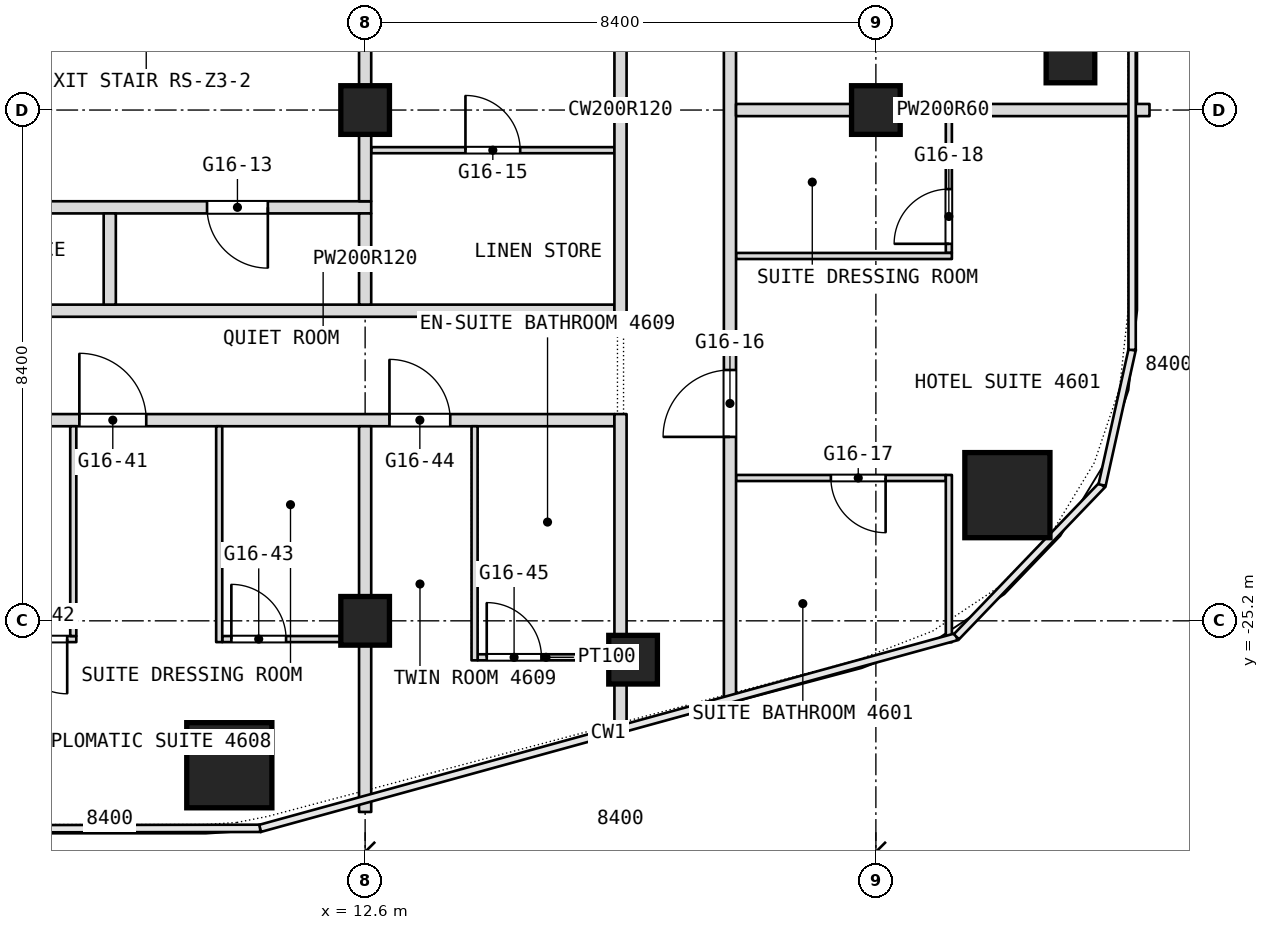
"""IFC4 building model, lengths in metres.
Left out: names, types, materials, properties, quantities, classifications, styles, units other than length and angle.
Written with IfcOpenShell. Run it as: python <this file> out.ifc"""

import sys

from ifc_helpers import new_model, si_unit, direction, frame, frame_2d, origin, origin_2d, place, context, subcontext, project, spatial, rectangle, extrude, element, fill, save


model = new_model("IFC4")
c1 = context("Model", 3, precision=1e-05, world=origin(), true_north=direction((0.0, 1.0)))
c2 = subcontext(c1, "Body", "Model", "MODEL_VIEW")
j1 = project(units=[si_unit("LENGTHUNIT", "METRE"), si_unit("PLANEANGLEUNIT", "RADIAN")], contexts=[c1])
p1 = place(None, origin())
s1 = spatial("IfcSite", under=j1, at=p1, CompositionType="ELEMENT")
p2 = place(p1, origin())
s2 = spatial("IfcBuilding", under=s1, at=p2, CompositionType="ELEMENT")
p3 = place(p2, frame((0.0, 0.0, 202.1)))
s3 = spatial("IfcBuildingStorey", under=s2, at=p3, CompositionType="ELEMENT", Elevation=202.1)
for number, where, z_axis, x_axis in (
    (1, (10.366, -27.575, 0.0), (0.0, 0.0, 1.0), (1.0, 0.0, 0.0)),
    (2, (23.163, -23.133, 0.0), (0.0, 0.0, 1.0), (1.0, 0.0, 0.0)),
):
    element("IfcColumn", number, at=place(p3, frame(where, z_axis=z_axis, x_axis=x_axis)), inside=s3, PredefinedType="COLUMN", context=c2, shape_type="SweptSolid", body=[
        extrude(rectangle(XDim=1.4, YDim=1.4, at=origin_2d()), origin(), (0.0, 0.0, 1.0), 3.6),
    ])
for number, where, z_axis, x_axis in (
    (3, (12.6, -25.2, 0.0), (0.0, 0.0, 1.0), (1.0, 0.0, 0.0)),
    (4, (12.6, -16.8, 0.0), (0.0, 0.0, 1.0), (1.0, 0.0, 0.0)),
    (5, (21.0, -16.8, 0.0), (0.0, 0.0, 1.0), (1.0, 0.0, 0.0)),
    (6, (24.2, -15.952, 0.0), (0.0, 0.0, 1.0), (1.0, 0.0, 0.0)),
    (7, (17.007, -25.839, 0.0), (0.0, 0.0, 1.0), (1.0, 0.0, 0.0)),
):
    element("IfcColumn", number, at=place(p3, frame(where, z_axis=z_axis, x_axis=x_axis)), inside=s3, PredefinedType="COLUMN", context=c2, shape_type="SweptSolid", body=[
        extrude(rectangle(XDim=0.8, YDim=0.8, at=origin_2d()), origin(), (0.0, 0.0, 1.0), 3.6),
    ])
p4 = place(p3, frame((14.45, -25.8, 0.0), z_axis=(0.0, 0.0, 1.0), x_axis=(1.0, 0.0, 0.0)))
e8 = element("IfcWall", 8, at=p4, inside=s3, PredefinedType="PARTITIONING", context=c2, shape_type="SweptSolid", body=[
    extrude(rectangle(XDim=2.25, YDim=0.1, at=frame_2d((1.125, 0.0))), origin(), (0.0, 0.0, 1.0), 3.34),
])
p5 = place(p4, frame((0.15, 0.0, 0.0)))
e9 = element("IfcOpeningElement", 9, at=p5, cuts=e8, PredefinedType="OPENING", context=c2, shape_type="SweptSolid", body=[
    extrude(rectangle(XDim=0.9, YDim=2.1, at=frame_2d((0.45, 1.05))), frame((0.0, 0.05, 0.0), z_axis=(0.0, -1.0, 0.0), x_axis=(1.0, 0.0, 0.0)), (0.0, 0.0, 1.0), 0.1),
])
p6 = place(p3, frame((0.65, -25.5, 0.0), z_axis=(0.0, 0.0, 1.0), x_axis=(1.0, 0.0, 0.0)))
e10 = element("IfcWall", 10, at=p6, inside=s3, PredefinedType="PARTITIONING", context=c2, shape_type="SweptSolid", body=[
    extrude(rectangle(XDim=7.2, YDim=0.1, at=frame_2d((3.6, 0.0))), origin(), (0.0, 0.0, 1.0), 3.34),
])
p7 = place(p6, frame((0.15, 0.0, 0.0)))
e11 = element("IfcOpeningElement", 11, at=p7, cuts=e10, PredefinedType="OPENING", context=c2, shape_type="SweptSolid", body=[
    extrude(rectangle(XDim=0.9, YDim=2.1, at=frame_2d((0.45, 1.05))), frame((0.0, 0.05, 0.0), z_axis=(0.0, -1.0, 0.0), x_axis=(1.0, 0.0, 0.0)), (0.0, 0.0, 1.0), 0.1),
])
p8 = place(p6, frame((6.15, 0.0, 0.0)))
e12 = element("IfcOpeningElement", 12, at=p8, cuts=e10, PredefinedType="OPENING", context=c2, shape_type="SweptSolid", body=[
    extrude(rectangle(XDim=0.9, YDim=2.1, at=frame_2d((0.45, 1.05))), frame((0.0, 0.05, 0.0), z_axis=(0.0, -1.0, 0.0), x_axis=(1.0, 0.0, 0.0)), (0.0, 0.0, 1.0), 0.1),
])
p9 = place(p3, frame((10.25, -25.5, 0.0), z_axis=(0.0, 0.0, 1.0), x_axis=(1.0, 0.0, 0.0)))
e13 = element("IfcWall", 13, at=p9, inside=s3, PredefinedType="PARTITIONING", context=c2, shape_type="SweptSolid", body=[
    extrude(rectangle(XDim=2.45, YDim=0.1, at=frame_2d((1.225, 0.0))), origin(), (0.0, 0.0, 1.0), 3.34),
])
p10 = place(p9, frame((0.15, 0.0, 0.0)))
e14 = element("IfcOpeningElement", 14, at=p10, cuts=e13, PredefinedType="OPENING", context=c2, shape_type="SweptSolid", body=[
    extrude(rectangle(XDim=0.9, YDim=2.1, at=frame_2d((0.45, 1.05))), frame((0.0, 0.05, 0.0), z_axis=(0.0, -1.0, 0.0), x_axis=(1.0, 0.0, 0.0)), (0.0, 0.0, 1.0), 0.1),
])
p11 = place(p3, frame((18.7, -22.851, 0.0), z_axis=(0.0, 0.0, 1.0), x_axis=(1.0, 0.0, 0.0)))
e15 = element("IfcWall", 15, at=p11, inside=s3, PredefinedType="PARTITIONING", context=c2, shape_type="SweptSolid", body=[
    extrude(rectangle(XDim=3.45, YDim=0.1, at=frame_2d((1.725, 0.0))), origin(), (0.0, 0.0, 1.0), 3.34),
])
p12 = place(p11, frame((1.56, 0.0, 0.0)))
e16 = element("IfcOpeningElement", 16, at=p12, cuts=e15, PredefinedType="OPENING", context=c2, shape_type="SweptSolid", body=[
    extrude(rectangle(XDim=0.9, YDim=2.1, at=frame_2d((0.45, 1.05))), frame((0.0, 0.05, 0.0), z_axis=(0.0, -1.0, 0.0), x_axis=(1.0, 0.0, 0.0)), (0.0, 0.0, 1.0), 0.1),
])
p13 = place(p3, frame((22.2, -25.552, 0.0), z_axis=(0.0, 0.0, 1.0), x_axis=(0.0, 1.0, 0.0)))
e17 = element("IfcWall", 17, at=p13, inside=s3, PredefinedType="PARTITIONING", context=c2, shape_type="SweptSolid", body=[
    extrude(rectangle(XDim=2.751, YDim=0.1, at=frame_2d((1.375, 0.0))), origin(), (0.0, 0.0, 1.0), 3.34),
])
p14 = place(p3, frame((22.2, -19.15, 0.0), z_axis=(0.0, 0.0, 1.0), x_axis=(0.0, 1.0, 0.0)))
e18 = element("IfcWall", 18, at=p14, inside=s3, PredefinedType="PARTITIONING", context=c2, shape_type="SweptSolid", body=[
    extrude(rectangle(XDim=2.45, YDim=0.1, at=frame_2d((1.225, 0.0))), origin(), (0.0, 0.0, 1.0), 3.34),
])
p15 = place(p14, frame((0.15, 0.0, 0.0)))
e19 = element("IfcOpeningElement", 19, at=p15, cuts=e18, PredefinedType="OPENING", context=c2, shape_type="SweptSolid", body=[
    extrude(rectangle(XDim=0.9, YDim=2.1, at=frame_2d((0.45, 1.05))), frame((0.0, 0.05, 0.0), z_axis=(0.0, -1.0, 0.0), x_axis=(1.0, 0.0, 0.0)), (0.0, 0.0, 1.0), 0.1),
])
p16 = place(p3, frame((-16.7, -21.9, 0.0), z_axis=(0.0, 0.0, 1.0), x_axis=(1.0, 0.0, 0.0)))
e20 = element("IfcWall", 20, at=p16, inside=s3, PredefinedType="PARTITIONING", context=c2, shape_type="SweptSolid", body=[
    extrude(rectangle(XDim=33.4, YDim=0.2, at=frame_2d((16.7, 0.0))), origin(), (0.0, 0.0, 1.0), 3.34),
])
p17 = place(p16, frame((0.3, 0.0, 0.0)))
e21 = element("IfcOpeningElement", 21, at=p17, cuts=e20, PredefinedType="OPENING", context=c2, shape_type="SweptSolid", body=[
    extrude(rectangle(XDim=1.0, YDim=2.1, at=frame_2d((0.5, 1.05))), frame((0.0, 0.1, 0.0), z_axis=(0.0, -1.0, 0.0), x_axis=(1.0, 0.0, 0.0)), (0.0, 0.0, 1.0), 0.2),
])
p18 = place(p16, frame((9.85, 0.0, 0.0)))
e22 = element("IfcOpeningElement", 22, at=p18, cuts=e20, PredefinedType="OPENING", context=c2, shape_type="SweptSolid", body=[
    extrude(rectangle(XDim=1.1, YDim=2.1, at=frame_2d((0.55, 1.05))), frame((0.0, 0.1, 0.0), z_axis=(0.0, -1.0, 0.0), x_axis=(1.0, 0.0, 0.0)), (0.0, 0.0, 1.0), 0.2),
])
p19 = place(p16, frame((16.1, 0.0, 0.0)))
e23 = element("IfcOpeningElement", 23, at=p19, cuts=e20, PredefinedType="OPENING", context=c2, shape_type="SweptSolid", body=[
    extrude(rectangle(XDim=1.1, YDim=2.1, at=frame_2d((0.55, 1.05))), frame((0.0, 0.1, 0.0), z_axis=(0.0, -1.0, 0.0), x_axis=(1.0, 0.0, 0.0)), (0.0, 0.0, 1.0), 0.2),
])
p20 = place(p16, frame((24.6, 0.0, 0.0)))
e24 = element("IfcOpeningElement", 24, at=p20, cuts=e20, PredefinedType="OPENING", context=c2, shape_type="SweptSolid", body=[
    extrude(rectangle(XDim=1.1, YDim=2.1, at=frame_2d((0.55, 1.05))), frame((0.0, 0.1, 0.0), z_axis=(0.0, -1.0, 0.0), x_axis=(1.0, 0.0, 0.0)), (0.0, 0.0, 1.0), 0.2),
])
p21 = place(p16, frame((29.7, 0.0, 0.0)))
e25 = element("IfcOpeningElement", 25, at=p21, cuts=e20, PredefinedType="OPENING", context=c2, shape_type="SweptSolid", body=[
    extrude(rectangle(XDim=1.0, YDim=2.1, at=frame_2d((0.5, 1.05))), frame((0.0, 0.1, 0.0), z_axis=(0.0, -1.0, 0.0), x_axis=(1.0, 0.0, 0.0)), (0.0, 0.0, 1.0), 0.2),
])
p22 = place(p3, frame((-4.1, -20.1, 0.0), z_axis=(0.0, 0.0, 1.0), x_axis=(1.0, 0.0, 0.0)))
e26 = element("IfcWall", 26, at=p22, inside=s3, PredefinedType="PARTITIONING", context=c2, shape_type="SweptSolid", body=[
    extrude(rectangle(XDim=20.8, YDim=0.2, at=frame_2d((10.4, 0.0))), origin(), (0.0, 0.0, 1.0), 3.34),
])
p23 = place(p3, frame((18.7, -19.2, 0.0), z_axis=(0.0, 0.0, 1.0), x_axis=(1.0, 0.0, 0.0)))
e27 = element("IfcWall", 27, at=p23, inside=s3, PredefinedType="PARTITIONING", context=c2, shape_type="SweptSolid", body=[
    extrude(rectangle(XDim=3.55, YDim=0.1, at=frame_2d((1.775, 0.0))), origin(), (0.0, 0.0, 1.0), 3.34),
])
p24 = place(p3, frame((18.6, -26.751, 0.0), z_axis=(0.0, 0.0, 1.0), x_axis=(0.0, 1.0, 0.0)))
e28 = element("IfcWall", 28, at=p24, inside=s3, PredefinedType="PARTITIONING", context=c2, shape_type="SweptSolid", body=[
    extrude(rectangle(XDim=49.091, YDim=0.2, at=frame_2d((24.545, 0.0))), origin(), (0.0, 0.0, 1.0), 3.34),
])
p25 = place(p24, frame((4.576, 0.0, 0.0)))
e29 = element("IfcOpeningElement", 29, at=p25, cuts=e28, PredefinedType="OPENING", context=c2, shape_type="SweptSolid", body=[
    extrude(rectangle(XDim=1.1, YDim=2.1, at=frame_2d((0.55, 1.05))), frame((0.0, 0.1, 0.0), z_axis=(0.0, -1.0, 0.0), x_axis=(1.0, 0.0, 0.0)), (0.0, 0.0, 1.0), 0.2),
])
p26 = place(p24, frame((13.251, 0.0, 0.0)))
e30 = element("IfcOpeningElement", 30, at=p26, cuts=e28, PredefinedType="OPENING", context=c2, shape_type="SweptSolid", body=[
    extrude(rectangle(XDim=1.8, YDim=2.1, at=frame_2d((0.9, 1.05))), frame((0.0, 0.1, 0.0), z_axis=(0.0, -1.0, 0.0), x_axis=(1.0, 0.0, 0.0)), (0.0, 0.0, 1.0), 0.2),
])
p27 = place(p24, frame((24.101, 0.0, 0.0)))
e31 = element("IfcOpeningElement", 31, at=p27, cuts=e28, PredefinedType="OPENING", context=c2, shape_type="SweptSolid", body=[
    extrude(rectangle(XDim=1.1, YDim=2.1, at=frame_2d((0.55, 1.05))), frame((0.0, 0.1, 0.0), z_axis=(0.0, -1.0, 0.0), x_axis=(1.0, 0.0, 0.0)), (0.0, 0.0, 1.0), 0.2),
])
p28 = place(p24, frame((30.051, 0.0, 0.0)))
e32 = element("IfcOpeningElement", 32, at=p28, cuts=e28, PredefinedType="OPENING", context=c2, shape_type="SweptSolid", body=[
    extrude(rectangle(XDim=1.8, YDim=2.1, at=frame_2d((0.9, 1.05))), frame((0.0, 0.1, 0.0), z_axis=(0.0, -1.0, 0.0), x_axis=(1.0, 0.0, 0.0)), (0.0, 0.0, 1.0), 0.2),
])
p29 = place(p24, frame((37.951, 0.0, 0.0)))
e33 = element("IfcOpeningElement", 33, at=p29, cuts=e28, PredefinedType="OPENING", context=c2, shape_type="SweptSolid", body=[
    extrude(rectangle(XDim=1.0, YDim=2.1, at=frame_2d((0.5, 1.05))), frame((0.0, 0.1, 0.0), z_axis=(0.0, -1.0, 0.0), x_axis=(1.0, 0.0, 0.0)), (0.0, 0.0, 1.0), 0.2),
])
p30 = place(p24, frame((39.751, 0.0, 0.0)))
e34 = element("IfcOpeningElement", 34, at=p30, cuts=e28, PredefinedType="OPENING", context=c2, shape_type="SweptSolid", body=[
    extrude(rectangle(XDim=1.0, YDim=2.1, at=frame_2d((0.5, 1.05))), frame((0.0, 0.1, 0.0), z_axis=(0.0, -1.0, 0.0), x_axis=(1.0, 0.0, 0.0)), (0.0, 0.0, 1.0), 0.2),
])
p31 = place(p24, frame((45.851, 0.0, 0.0)))
e35 = element("IfcOpeningElement", 35, at=p31, cuts=e28, PredefinedType="OPENING", context=c2, shape_type="SweptSolid", body=[
    extrude(rectangle(XDim=1.0, YDim=2.1, at=frame_2d((0.5, 1.05))), frame((0.0, 0.1, 0.0), z_axis=(0.0, -1.0, 0.0), x_axis=(1.0, 0.0, 0.0)), (0.0, 0.0, 1.0), 0.2),
])
p32 = place(p3, frame((5.7, -18.4, 0.0), z_axis=(0.0, 0.0, 1.0), x_axis=(1.0, 0.0, 0.0)))
e36 = element("IfcWall", 36, at=p32, inside=s3, PredefinedType="PARTITIONING", context=c2, shape_type="SweptSolid", body=[
    extrude(rectangle(XDim=7.0, YDim=0.2, at=frame_2d((3.5, 0.0))), origin(), (0.0, 0.0, 1.0), 3.34),
])
p33 = place(p32, frame((4.3, 0.0, 0.0)))
e37 = element("IfcOpeningElement", 37, at=p33, cuts=e36, PredefinedType="OPENING", context=c2, shape_type="SweptSolid", body=[
    extrude(rectangle(XDim=1.0, YDim=2.1, at=frame_2d((0.5, 1.05))), frame((0.0, 0.1, 0.0), z_axis=(0.0, -1.0, 0.0), x_axis=(1.0, 0.0, 0.0)), (0.0, 0.0, 1.0), 0.2),
])
p34 = place(p3, frame((12.7, -17.46, 0.0), z_axis=(0.0, 0.0, 1.0), x_axis=(1.0, 0.0, 0.0)))
e38 = element("IfcWall", 38, at=p34, inside=s3, PredefinedType="PARTITIONING", context=c2, shape_type="SweptSolid", body=[
    extrude(rectangle(XDim=4.0, YDim=0.1, at=frame_2d((2.0, 0.0))), origin(), (0.0, 0.0, 1.0), 3.34),
])
p35 = place(p34, frame((1.55, 0.0, 0.0)))
e39 = element("IfcOpeningElement", 39, at=p35, cuts=e38, PredefinedType="OPENING", context=c2, shape_type="SweptSolid", body=[
    extrude(rectangle(XDim=0.9, YDim=2.1, at=frame_2d((0.45, 1.05))), frame((0.0, 0.05, 0.0), z_axis=(0.0, -1.0, 0.0), x_axis=(1.0, 0.0, 0.0)), (0.0, 0.0, 1.0), 0.1),
])
p36 = place(p3, frame((16.8, -27.229, 0.0), z_axis=(0.0, 0.0, 1.0), x_axis=(0.0, 1.0, 0.0)))
e40 = element("IfcWall", 40, at=p36, inside=s3, PredefinedType="PARTITIONING", context=c2, shape_type="SweptSolid", body=[
    extrude(rectangle(XDim=5.429, YDim=0.2, at=frame_2d((2.714, 0.0))), origin(), (0.0, 0.0, 1.0), 3.34),
])
p37 = place(p3, frame((16.8, -20.2, 0.0), z_axis=(0.0, 0.0, 1.0), x_axis=(0.0, 1.0, 0.0)))
e41 = element("IfcWall", 41, at=p37, inside=s3, PredefinedType="PARTITIONING", context=c2, shape_type="SweptSolid", body=[
    extrude(rectangle(XDim=6.8, YDim=0.2, at=frame_2d((3.4, 0.0))), origin(), (0.0, 0.0, 1.0), 3.34),
])
p38 = place(p3, frame((18.7, -16.8, 0.0), z_axis=(0.0, 0.0, 1.0), x_axis=(1.0, 0.0, 0.0)))
e42 = element("IfcWall", 42, at=p38, inside=s3, PredefinedType="PARTITIONING", context=c2, shape_type="SweptSolid", body=[
    extrude(rectangle(XDim=6.8, YDim=0.2, at=frame_2d((3.4, 0.0))), origin(), (0.0, 0.0, 1.0), 2.94),
])
p39 = place(p3, frame((14.4, -25.85, 0.0), z_axis=(0.0, 0.0, 1.0), x_axis=(0.0, 1.0, 0.0)))
e43 = element("IfcWall", 43, at=p39, inside=s3, PredefinedType="PARTITIONING", context=c2, shape_type="SweptSolid", body=[
    extrude(rectangle(XDim=3.85, YDim=0.1, at=frame_2d((1.925, 0.0))), origin(), (0.0, 0.0, 1.0), 3.34),
])
p40 = place(p3, frame((12.6, -28.343, 0.0), z_axis=(0.0, 0.0, 1.0), x_axis=(0.0, 1.0, 0.0)))
e44 = element("IfcWall", 44, at=p40, inside=s3, PredefinedType="PARTITIONING", context=c2, shape_type="SweptSolid", body=[
    extrude(rectangle(XDim=6.343, YDim=0.2, at=frame_2d((3.171, 0.0))), origin(), (0.0, 0.0, 1.0), 3.34),
])
p41 = place(p3, frame((12.6, -20.0, 0.0), z_axis=(0.0, 0.0, 1.0), x_axis=(0.0, 1.0, 0.0)))
e45 = element("IfcWall", 45, at=p41, inside=s3, PredefinedType="PARTITIONING", context=c2, shape_type="SweptSolid", body=[
    extrude(rectangle(XDim=1.5, YDim=0.2, at=frame_2d((0.75, 0.0))), origin(), (0.0, 0.0, 1.0), 3.34),
])
p42 = place(p3, frame((12.6, -18.3, 0.0), z_axis=(0.0, 0.0, 1.0), x_axis=(0.0, 1.0, 0.0)))
e46 = element("IfcWall", 46, at=p42, inside=s3, PredefinedType="PARTITIONING", context=c2, shape_type="SweptSolid", body=[
    extrude(rectangle(XDim=4.7, YDim=0.2, at=frame_2d((2.35, 0.0))), origin(), (0.0, 0.0, 1.0), 3.34),
])
p43 = place(p3, frame((10.2, -25.55, 0.0), z_axis=(0.0, 0.0, 1.0), x_axis=(0.0, 1.0, 0.0)))
e47 = element("IfcWall", 47, at=p43, inside=s3, PredefinedType="PARTITIONING", context=c2, shape_type="SweptSolid", body=[
    extrude(rectangle(XDim=3.55, YDim=0.1, at=frame_2d((1.775, 0.0))), origin(), (0.0, 0.0, 1.0), 3.34),
])
p44 = place(p3, frame((8.4, -20.0, 0.0), z_axis=(0.0, 0.0, 1.0), x_axis=(0.0, 1.0, 0.0)))
e48 = element("IfcWall", 48, at=p44, inside=s3, PredefinedType="PARTITIONING", context=c2, shape_type="SweptSolid", body=[
    extrude(rectangle(XDim=1.5, YDim=0.2, at=frame_2d((0.75, 0.0))), origin(), (0.0, 0.0, 1.0), 3.34),
])
p45 = place(p3, frame((7.8, -25.45, 0.0), z_axis=(0.0, 0.0, 1.0), x_axis=(0.0, 1.0, 0.0)))
e49 = element("IfcWall", 49, at=p45, inside=s3, PredefinedType="PARTITIONING", context=c2, shape_type="SweptSolid", body=[
    extrude(rectangle(XDim=3.45, YDim=0.1, at=frame_2d((1.725, 0.0))), origin(), (0.0, 0.0, 1.0), 3.34),
])
p46 = place(p5, origin())
e50 = element("IfcDoor", 50, at=p46, inside=s3, OperationType="SINGLE_SWING_LEFT", PredefinedType="DOOR", context=c2, shape_type="SweptSolid", body=[
    extrude(rectangle(XDim=0.9, YDim=2.1, at=frame_2d((0.45, 1.05))), frame((0.0, 0.025, 0.0), z_axis=(0.0, -1.0, 0.0), x_axis=(1.0, 0.0, 0.0)), (0.0, 0.0, 1.0), 0.05),
])
fill(e9, e50)
p47 = place(p8, origin())
e51 = element("IfcDoor", 51, at=p47, inside=s3, OperationType="SINGLE_SWING_RIGHT", PredefinedType="DOOR", context=c2, shape_type="SweptSolid", body=[
    extrude(rectangle(XDim=0.9, YDim=2.1, at=frame_2d((0.45, 1.05))), frame((0.0, 0.025, 0.0), z_axis=(0.0, -1.0, 0.0), x_axis=(1.0, 0.0, 0.0)), (0.0, 0.0, 1.0), 0.05),
])
fill(e12, e51)
p48 = place(p10, origin())
e52 = element("IfcDoor", 52, at=p48, inside=s3, OperationType="SINGLE_SWING_LEFT", PredefinedType="DOOR", context=c2, shape_type="SweptSolid", body=[
    extrude(rectangle(XDim=0.9, YDim=2.1, at=frame_2d((0.45, 1.05))), frame((0.0, 0.025, 0.0), z_axis=(0.0, -1.0, 0.0), x_axis=(1.0, 0.0, 0.0)), (0.0, 0.0, 1.0), 0.05),
])
fill(e14, e52)
p49 = place(p12, origin())
e53 = element("IfcDoor", 53, at=p49, inside=s3, OperationType="SINGLE_SWING_LEFT", PredefinedType="DOOR", context=c2, shape_type="SweptSolid", body=[
    extrude(rectangle(XDim=0.9, YDim=2.1, at=frame_2d((0.45, 1.05))), frame((0.0, 0.025, 0.0), z_axis=(0.0, -1.0, 0.0), x_axis=(1.0, 0.0, 0.0)), (0.0, 0.0, 1.0), 0.05),
])
fill(e16, e53)
p50 = place(p15, origin())
e54 = element("IfcDoor", 54, at=p50, inside=s3, OperationType="SINGLE_SWING_LEFT", PredefinedType="DOOR", context=c2, shape_type="SweptSolid", body=[
    extrude(rectangle(XDim=0.9, YDim=2.1, at=frame_2d((0.45, 1.05))), frame((0.0, 0.025, 0.0), z_axis=(0.0, -1.0, 0.0), x_axis=(1.0, 0.0, 0.0)), (0.0, 0.0, 1.0), 0.05),
])
fill(e19, e54)
p51 = place(p20, origin())
e55 = element("IfcDoor", 55, at=p51, inside=s3, OperationType="SINGLE_SWING_RIGHT", PredefinedType="DOOR", context=c2, shape_type="SweptSolid", body=[
    extrude(rectangle(XDim=1.1, YDim=2.1, at=frame_2d((0.55, 1.05))), frame((0.0, 0.025, 0.0), z_axis=(0.0, -1.0, 0.0), x_axis=(1.0, 0.0, 0.0)), (0.0, 0.0, 1.0), 0.05),
])
fill(e24, e55)
p52 = place(p21, origin())
e56 = element("IfcDoor", 56, at=p52, inside=s3, OperationType="SINGLE_SWING_RIGHT", PredefinedType="DOOR", context=c2, shape_type="SweptSolid", body=[
    extrude(rectangle(XDim=1.0, YDim=2.1, at=frame_2d((0.5, 1.05))), frame((0.0, 0.025, 0.0), z_axis=(0.0, -1.0, 0.0), x_axis=(1.0, 0.0, 0.0)), (0.0, 0.0, 1.0), 0.05),
])
fill(e25, e56)
p53 = place(p25, origin())
e57 = element("IfcDoor", 57, at=p53, inside=s3, OperationType="SINGLE_SWING_RIGHT", PredefinedType="DOOR", context=c2, shape_type="SweptSolid", body=[
    extrude(rectangle(XDim=1.1, YDim=2.1, at=frame_2d((0.55, 1.05))), frame((0.0, 0.025, 0.0), z_axis=(0.0, -1.0, 0.0), x_axis=(1.0, 0.0, 0.0)), (0.0, 0.0, 1.0), 0.05),
])
fill(e29, e57)
p54 = place(p33, origin())
e58 = element("IfcDoor", 58, at=p54, inside=s3, OperationType="SINGLE_SWING_RIGHT", PredefinedType="DOOR", context=c2, shape_type="SweptSolid", body=[
    extrude(rectangle(XDim=1.0, YDim=2.1, at=frame_2d((0.5, 1.05))), frame((0.0, 0.025, 0.0), z_axis=(0.0, -1.0, 0.0), x_axis=(1.0, 0.0, 0.0)), (0.0, 0.0, 1.0), 0.05),
])
fill(e37, e58)
p55 = place(p35, origin())
e59 = element("IfcDoor", 59, at=p55, inside=s3, OperationType="SINGLE_SWING_RIGHT", PredefinedType="DOOR", context=c2, shape_type="SweptSolid", body=[
    extrude(rectangle(XDim=0.9, YDim=2.1, at=frame_2d((0.45, 1.05))), frame((0.0, 0.025, 0.0), z_axis=(0.0, -1.0, 0.0), x_axis=(1.0, 0.0, 0.0)), (0.0, 0.0, 1.0), 0.05),
])
fill(e39, e59)
save(model, sys.argv[1])
